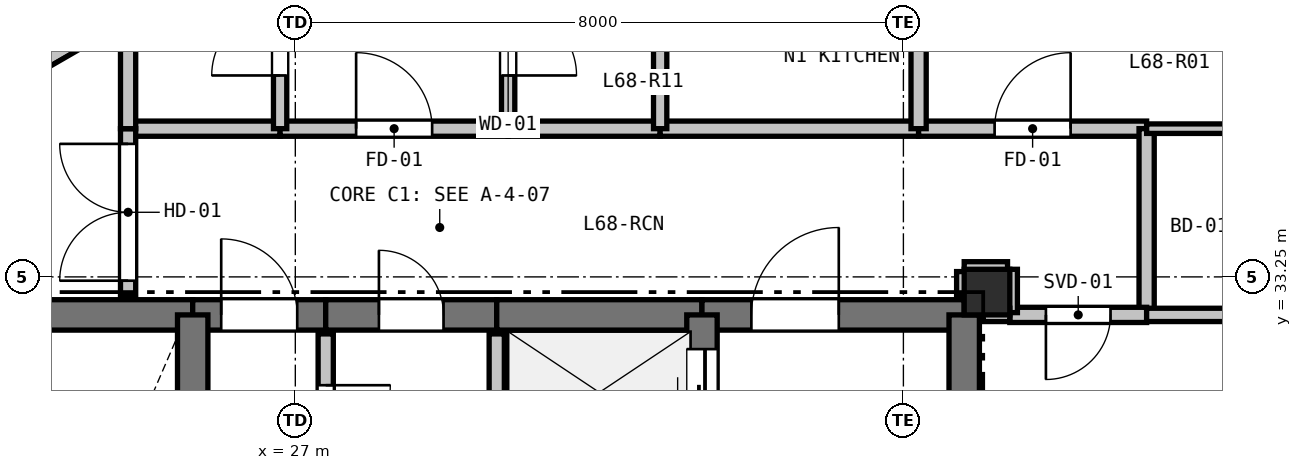
"""IFC4 building model, lengths in metres.
Left out: names, types, materials, properties, quantities, classifications, styles, units other than length and angle.
Written with IfcOpenShell. Run it as: python <this file> out.ifc"""

import sys

from ifc_helpers import new_model, si_unit, direction, frame, frame_2d, origin, origin_2d, place, context, subcontext, project, spatial, rectangle, extrude, element, fill, save


model = new_model("IFC4")
c1 = context("Model", 3, precision=1e-05, world=origin(), true_north=direction((0.0, 1.0)))
c2 = subcontext(c1, "Body", "Model", "MODEL_VIEW")
j1 = project(units=[si_unit("LENGTHUNIT", "METRE"), si_unit("PLANEANGLEUNIT", "RADIAN")], contexts=[c1])
p1 = place(None, origin())
s1 = spatial("IfcSite", under=j1, at=p1, CompositionType="ELEMENT")
p2 = place(p1, origin())
s2 = spatial("IfcBuilding", under=s1, at=p2, CompositionType="ELEMENT")
p3 = place(p2, frame((0.0, 0.0, 243.0)))
s3 = spatial("IfcBuildingStorey", under=s2, at=p3, CompositionType="ELEMENT", Elevation=243.0)
p4 = place(p3, frame((36.1, 33.05, 0.0), z_axis=(0.0, 0.0, 1.0), x_axis=(1.0, 0.0, 0.0)))
e1 = element("IfcColumn", 1, at=p4, inside=s3, PredefinedType="COLUMN", context=c2, shape_type="SweptSolid", body=[
    extrude(rectangle(XDim=0.6, YDim=0.6, at=origin_2d()), origin(), (0.0, 0.0, 1.0), 3.3),
])
p5 = place(p3, frame((20.066, 33.997, 0.0), z_axis=(0.0, 0.0, 1.0), x_axis=(0.866019557082, 0.500010126649, 0.0)))
e2 = element("IfcWall", 2, at=p5, inside=s3, PredefinedType="PARAPET", context=c2, shape_type="SweptSolid", body=[
    extrude(rectangle(XDim=8.228, YDim=0.2, at=frame_2d((4.114, 0.0))), origin(), (0.0, 0.0, 1.0), 0.2),
])
p6 = place(p3, frame((22.2, 32.75, 0.0), z_axis=(0.0, 0.0, 1.0), x_axis=(1.0, 0.0, 0.0)))
e3 = element("IfcWall", 3, at=p6, inside=s3, PredefinedType="SHEAR", context=c2, shape_type="SweptSolid", body=[
    extrude(rectangle(XDim=3.45, YDim=0.4, at=frame_2d((1.725, 0.0))), origin(), (0.0, 0.0, 1.0), 3.08),
])
p7 = place(p3, frame((25.65, 32.75, 0.0), z_axis=(0.0, 0.0, 1.0), x_axis=(1.0, 0.0, 0.0)))
e4 = element("IfcWall", 4, at=p7, inside=s3, PredefinedType="SHEAR", context=c2, shape_type="SweptSolid", body=[
    extrude(rectangle(XDim=1.75, YDim=0.4, at=frame_2d((0.875, 0.0))), origin(), (0.0, 0.0, 1.0), 3.08),
])
p8 = place(p7, frame((0.375, 0.0, 0.0)))
e5 = element("IfcOpeningElement", 5, at=p8, cuts=e4, PredefinedType="OPENING", context=c2, shape_type="SweptSolid", body=[
    extrude(rectangle(XDim=1.0, YDim=2.15, at=frame_2d((0.5, 1.075))), frame((0.0, 0.21, 0.0), z_axis=(0.0, -1.0, 0.0), x_axis=(1.0, 0.0, 0.0)), (0.0, 0.0, 1.0), 0.42),
])
p9 = place(p3, frame((27.4, 32.75, 0.0), z_axis=(0.0, 0.0, 1.0), x_axis=(1.0, 0.0, 0.0)))
e6 = element("IfcWall", 6, at=p9, inside=s3, PredefinedType="SHEAR", context=c2, shape_type="SweptSolid", body=[
    extrude(rectangle(XDim=2.25, YDim=0.4, at=frame_2d((1.125, 0.0))), origin(), (0.0, 0.0, 1.0), 3.08),
])
p10 = place(p9, frame((0.7, 0.0, 0.0)))
e7 = element("IfcOpeningElement", 7, at=p10, cuts=e6, PredefinedType="OPENING", context=c2, shape_type="SweptSolid", body=[
    extrude(rectangle(XDim=0.85, YDim=2.1, at=frame_2d((0.425, 1.05))), frame((0.0, 0.21, 0.0), z_axis=(0.0, -1.0, 0.0), x_axis=(1.0, 0.0, 0.0)), (0.0, 0.0, 1.0), 0.42),
])
p11 = place(p3, frame((29.65, 32.75, 0.0), z_axis=(0.0, 0.0, 1.0), x_axis=(1.0, 0.0, 0.0)))
e8 = element("IfcWall", 8, at=p11, inside=s3, PredefinedType="SHEAR", context=c2, shape_type="SweptSolid", body=[
    extrude(rectangle(XDim=2.7, YDim=0.4, at=frame_2d((1.35, 0.0))), origin(), (0.0, 0.0, 1.0), 3.08),
])
p12 = place(p3, frame((32.35, 32.75, 0.0), z_axis=(0.0, 0.0, 1.0), x_axis=(1.0, 0.0, 0.0)))
e9 = element("IfcWall", 9, at=p12, inside=s3, PredefinedType="SHEAR", context=c2, shape_type="SweptSolid", body=[
    extrude(rectangle(XDim=3.45, YDim=0.4, at=frame_2d((1.725, 0.0))), origin(), (0.0, 0.0, 1.0), 3.08),
])
p13 = place(p12, frame((0.65, 0.0, 0.0)))
e10 = element("IfcOpeningElement", 10, at=p13, cuts=e9, PredefinedType="OPENING", context=c2, shape_type="SweptSolid", body=[
    extrude(rectangle(XDim=1.15, YDim=2.15, at=frame_2d((0.575, 1.075))), frame((0.0, 0.21, 0.0), z_axis=(0.0, -1.0, 0.0), x_axis=(1.0, 0.0, 0.0)), (0.0, 0.0, 1.0), 0.42),
])
p14 = place(p3, frame((35.8, 32.75, 0.0), z_axis=(0.0, 0.0, 1.0), x_axis=(0.0, -1.0, 0.0)))
e11 = element("IfcWall", 11, at=p14, inside=s3, PredefinedType="SHEAR", context=c2, shape_type="SweptSolid", body=[
    extrude(rectangle(XDim=4.65, YDim=0.4, at=frame_2d((2.325, 0.0))), origin(), (0.0, 0.0, 1.0), 3.08),
])
p15 = place(p3, frame((25.65, 27.95, 0.0), z_axis=(0.0, 0.0, 1.0), x_axis=(0.0, 1.0, 0.0)))
e12 = element("IfcWall", 12, at=p15, inside=s3, PredefinedType="SHEAR", context=c2, shape_type="SweptSolid", body=[
    extrude(rectangle(XDim=4.8, YDim=0.4, at=frame_2d((2.4, 0.0))), origin(), (0.0, 0.0, 1.0), 3.08),
])
p16 = place(p3, frame((32.35, 30.75, 0.0), z_axis=(0.0, 0.0, 1.0), x_axis=(0.0, 1.0, 0.0)))
e13 = element("IfcWall", 13, at=p16, inside=s3, PredefinedType="SHEAR", context=c2, shape_type="SweptSolid", body=[
    extrude(rectangle(XDim=2.0, YDim=0.4, at=frame_2d((1.0, 0.0))), origin(), (0.0, 0.0, 1.0), 3.08),
])
p17 = place(p16, frame((0.45, 0.0, 0.0)))
e14 = element("IfcOpeningElement", 14, at=p17, cuts=e13, PredefinedType="OPENING", context=c2, shape_type="SweptSolid", body=[
    extrude(rectangle(XDim=1.1, YDim=2.15, at=frame_2d((0.55, 1.075))), frame((0.0, 0.21, 0.0), z_axis=(0.0, -1.0, 0.0), x_axis=(1.0, 0.0, 0.0)), (0.0, 0.0, 1.0), 0.42),
])
p18 = place(p3, frame((29.65, 30.3, 0.0), z_axis=(0.0, 0.0, 1.0), x_axis=(0.0, 1.0, 0.0)))
e15 = element("IfcWall", 15, at=p18, inside=s3, PredefinedType="PARTITIONING", context=c2, shape_type="SweptSolid", body=[
    extrude(rectangle(XDim=2.2, YDim=0.2, at=frame_2d((1.1, 0.0))), origin(), (0.0, 0.0, 1.0), 3.08),
])
p19 = place(p3, frame((27.4, 32.5, 0.0), z_axis=(0.0, 0.0, 1.0), x_axis=(0.0, -1.0, 0.0)))
e16 = element("IfcWall", 16, at=p19, inside=s3, PredefinedType="PARTITIONING", context=c2, shape_type="SweptSolid", body=[
    extrude(rectangle(XDim=2.2, YDim=0.2, at=frame_2d((1.1, 0.0))), origin(), (0.0, 0.0, 1.0), 3.08),
])
p20 = place(p19, frame((0.675, 0.0, 0.0)))
e17 = element("IfcOpeningElement", 17, at=p20, cuts=e16, PredefinedType="OPENING", context=c2, shape_type="SweptSolid", body=[
    extrude(rectangle(XDim=0.85, YDim=2.1, at=frame_2d((0.425, 1.05))), frame((0.0, 0.11, 0.0), z_axis=(0.0, -1.0, 0.0), x_axis=(1.0, 0.0, 0.0)), (0.0, 0.0, 1.0), 0.22),
])
p21 = place(p3, frame((24.8, 35.2, 0.0), z_axis=(0.0, 0.0, 1.0), x_axis=(1.0, 0.0, 0.0)))
e18 = element("IfcWall", 18, at=p21, inside=s3, PredefinedType="PARTITIONING", context=c2, shape_type="SweptSolid", body=[
    extrude(rectangle(XDim=2.0, YDim=0.2, at=frame_2d((1.0, 0.0))), origin(), (0.0, 0.0, 1.0), 3.08),
])
p22 = place(p3, frame((26.8, 35.2, 0.0), z_axis=(0.0, 0.0, 1.0), x_axis=(1.0, 0.0, 0.0)))
e19 = element("IfcWall", 19, at=p22, inside=s3, PredefinedType="PARTITIONING", context=c2, shape_type="SweptSolid", body=[
    extrude(rectangle(XDim=3.0, YDim=0.2, at=frame_2d((1.5, 0.0))), origin(), (0.0, 0.0, 1.0), 3.08),
])
p23 = place(p22, frame((1.0, 0.0, 0.0)))
e20 = element("IfcOpeningElement", 20, at=p23, cuts=e19, PredefinedType="OPENING", context=c2, shape_type="SweptSolid", body=[
    extrude(rectangle(XDim=1.0, YDim=2.15, at=frame_2d((0.5, 1.075))), frame((0.0, 0.11, 0.0), z_axis=(0.0, -1.0, 0.0), x_axis=(1.0, 0.0, 0.0)), (0.0, 0.0, 1.0), 0.22),
])
p24 = place(p3, frame((29.8, 35.2, 0.0), z_axis=(0.0, 0.0, 1.0), x_axis=(1.0, 0.0, 0.0)))
e21 = element("IfcWall", 21, at=p24, inside=s3, PredefinedType="PARTITIONING", context=c2, shape_type="SweptSolid", body=[
    extrude(rectangle(XDim=2.0, YDim=0.2, at=frame_2d((1.0, 0.0))), origin(), (0.0, 0.0, 1.0), 3.08),
])
p25 = place(p3, frame((31.8, 35.2, 0.0), z_axis=(0.0, 0.0, 1.0), x_axis=(1.0, 0.0, 0.0)))
e22 = element("IfcWall", 22, at=p25, inside=s3, PredefinedType="PARTITIONING", context=c2, shape_type="SweptSolid", body=[
    extrude(rectangle(XDim=3.4, YDim=0.2, at=frame_2d((1.7, 0.0))), origin(), (0.0, 0.0, 1.0), 3.08),
])
p26 = place(p3, frame((35.2, 35.2, 0.0), z_axis=(0.0, 0.0, 1.0), x_axis=(1.0, 0.0, 0.0)))
e23 = element("IfcWall", 23, at=p26, inside=s3, PredefinedType="PARTITIONING", context=c2, shape_type="SweptSolid", body=[
    extrude(rectangle(XDim=3.0, YDim=0.2, at=frame_2d((1.5, 0.0))), origin(), (0.0, 0.0, 1.0), 2.528),
])
p27 = place(p26, frame((1.0, 0.0, 0.0)))
e24 = element("IfcOpeningElement", 24, at=p27, cuts=e23, PredefinedType="OPENING", context=c2, shape_type="SweptSolid", body=[
    extrude(rectangle(XDim=1.0, YDim=2.15, at=frame_2d((0.5, 1.075))), frame((0.0, 0.11, 0.0), z_axis=(0.0, -1.0, 0.0), x_axis=(1.0, 0.0, 0.0)), (0.0, 0.0, 1.0), 0.22),
])
p28 = place(p3, frame((38.2, 35.2, 0.0), z_axis=(0.0, 0.0, 1.0), x_axis=(0.0, -1.0, 0.0)))
e25 = element("IfcWall", 25, at=p28, inside=s3, PredefinedType="PARTITIONING", context=c2, shape_type="SweptSolid", body=[
    extrude(rectangle(XDim=2.45, YDim=0.2, at=frame_2d((1.225, 0.0))), origin(), (0.0, 0.0, 1.0), 3.08),
])
p29 = place(p3, frame((38.2, 32.75, 0.0), z_axis=(0.0, 0.0, 1.0), x_axis=(-1.0, 0.0, 0.0)))
e26 = element("IfcWall", 26, at=p29, inside=s3, PredefinedType="PARTITIONING", context=c2, shape_type="SweptSolid", body=[
    extrude(rectangle(XDim=1.8, YDim=0.2, at=frame_2d((0.9, 0.0))), origin(), (0.0, 0.0, 1.0), 3.08),
])
p30 = place(p29, frame((0.475, 0.0, 0.0)))
e27 = element("IfcOpeningElement", 27, at=p30, cuts=e26, PredefinedType="OPENING", context=c2, shape_type="SweptSolid", body=[
    extrude(rectangle(XDim=0.85, YDim=2.1, at=frame_2d((0.425, 1.05))), frame((0.0, 0.11, 0.0), z_axis=(0.0, -1.0, 0.0), x_axis=(1.0, 0.0, 0.0)), (0.0, 0.0, 1.0), 0.22),
])
for number, where, z_axis, x_axis in (
    (28, (36.4, 32.78, 0.0), (0.0, 0.0, 1.0), (0.0, 1.0, 0.0)),
    (29, (36.37, 33.35, 0.0), (0.0, 0.0, 1.0), (-1.0, 0.0, 0.0)),
):
    element("IfcWall", number, at=place(p3, frame(where, z_axis=z_axis, x_axis=x_axis)), inside=s3, PredefinedType="PARTITIONING", context=c2, shape_type="SweptSolid", body=[
        extrude(rectangle(XDim=0.57, YDim=0.2, at=frame_2d((0.285, 0.0))), origin(), (0.0, 0.0, 1.0), 2.528),
    ])
p31 = place(p3, frame((35.8, 33.32, 0.0), z_axis=(0.0, 0.0, 1.0), x_axis=(0.0, -1.0, 0.0)))
e30 = element("IfcWall", 30, at=p31, inside=s3, PredefinedType="PARTITIONING", context=c2, shape_type="SweptSolid", body=[
    extrude(rectangle(XDim=0.32, YDim=0.2, at=frame_2d((0.16, 0.0))), origin(), (0.0, 0.0, 1.0), 2.605),
])
p32 = place(p3, frame((24.8, 33.0, 0.0), z_axis=(0.0, 0.0, 1.0), x_axis=(0.0, 1.0, 0.0)))
e31 = element("IfcWall", 31, at=p32, inside=s3, PredefinedType="PARTITIONING", context=c2, shape_type="SweptSolid", body=[
    extrude(rectangle(XDim=2.2, YDim=0.2, at=frame_2d((1.1, 0.0))), origin(), (0.0, 0.0, 1.0), 2.605),
])
p33 = place(p32, frame((0.2, 0.0, 0.0)))
e32 = element("IfcOpeningElement", 32, at=p33, cuts=e31, PredefinedType="OPENING", context=c2, shape_type="SweptSolid", body=[
    extrude(rectangle(XDim=1.8, YDim=2.2, at=frame_2d((0.9, 1.1))), frame((0.0, 0.11, 0.0), z_axis=(0.0, -1.0, 0.0), x_axis=(1.0, 0.0, 0.0)), (0.0, 0.0, 1.0), 0.22),
])
p34 = place(p3, frame((29.8, 37.5, 0.0), z_axis=(0.0, 0.0, 1.0), x_axis=(0.0, -1.0, 0.0)))
e33 = element("IfcWall", 33, at=p34, inside=s3, PredefinedType="PLUMBINGWALL", context=c2, shape_type="SweptSolid", body=[
    extrude(rectangle(XDim=2.3, YDim=0.175, at=frame_2d((1.15, 0.0))), origin(), (0.0, 0.0, 1.0), 3.08),
])
p35 = place(p34, frame((0.7, 0.0, 0.0)))
e34 = element("IfcOpeningElement", 34, at=p35, cuts=e33, PredefinedType="OPENING", context=c2, shape_type="SweptSolid", body=[
    extrude(rectangle(XDim=0.9, YDim=2.1, at=frame_2d((0.45, 1.05))), frame((0.0, 0.097, 0.0), z_axis=(0.0, -1.0, 0.0), x_axis=(1.0, 0.0, 0.0)), (0.0, 0.0, 1.0), 0.195),
])
p36 = place(p3, frame((26.8, 35.2, 0.0), z_axis=(0.0, 0.0, 1.0), x_axis=(0.0, 1.0, 0.0)))
e35 = element("IfcWall", 35, at=p36, inside=s3, PredefinedType="PLUMBINGWALL", context=c2, shape_type="SweptSolid", body=[
    extrude(rectangle(XDim=2.3, YDim=0.175, at=frame_2d((1.15, 0.0))), origin(), (0.0, 0.0, 1.0), 2.365),
])
p37 = place(p36, frame((0.7, 0.0, 0.0)))
e36 = element("IfcOpeningElement", 36, at=p37, cuts=e35, PredefinedType="OPENING", context=c2, shape_type="SweptSolid", body=[
    extrude(rectangle(XDim=0.9, YDim=2.1, at=frame_2d((0.45, 1.05))), frame((0.0, 0.097, 0.0), z_axis=(0.0, -1.0, 0.0), x_axis=(1.0, 0.0, 0.0)), (0.0, 0.0, 1.0), 0.195),
])
p38 = place(p3, frame((36.05, 32.75, 0.0), z_axis=(0.0, 0.0, 1.0), x_axis=(1.0, 0.0, 0.0)))
e37 = element("IfcWall", 37, at=p38, inside=s3, PredefinedType="PLUMBINGWALL", context=c2, shape_type="SweptSolid", body=[
    extrude(rectangle(XDim=0.35, YDim=0.175, at=frame_2d((0.175, 0.0))), origin(), (0.0, 0.0, 1.0), 2.605),
])
p39 = place(p3, frame((38.2, 32.75, 0.0), z_axis=(0.0, 0.0, 1.0), x_axis=(1.0, 0.0, 0.0)))
e38 = element("IfcWall", 38, at=p39, inside=s3, PredefinedType="PLUMBINGWALL", context=c2, shape_type="SweptSolid", body=[
    extrude(rectangle(XDim=1.406, YDim=0.175, at=frame_2d((0.703, 0.0))), origin(), (0.0, 0.0, 1.0), 2.365),
])
p40 = place(p3, frame((24.8, 35.2, 0.0), z_axis=(0.0, 0.0, 1.0), x_axis=(0.0, 1.0, 0.0)))
e39 = element("IfcWall", 39, at=p40, inside=s3, PredefinedType="PARTITIONING", context=c2, shape_type="SweptSolid", body=[
    extrude(rectangle(XDim=1.484, YDim=0.2, at=frame_2d((0.742, 0.0))), origin(), (0.0, 0.0, 1.0), 2.365),
])
p41 = place(p3, frame((31.8, 37.5, 0.0), z_axis=(0.0, 0.0, 1.0), x_axis=(0.0, -1.0, 0.0)))
e40 = element("IfcWall", 40, at=p41, inside=s3, PredefinedType="PLUMBINGWALL", context=c2, shape_type="SweptSolid", body=[
    extrude(rectangle(XDim=2.3, YDim=0.175, at=frame_2d((1.15, 0.0))), origin(), (0.0, 0.0, 1.0), 3.08),
])
p42 = place(p3, frame((35.2, 37.5, 0.0), z_axis=(0.0, 0.0, 1.0), x_axis=(0.0, -1.0, 0.0)))
e41 = element("IfcWall", 41, at=p42, inside=s3, PredefinedType="PARTITIONING", context=c2, shape_type="SweptSolid", body=[
    extrude(rectangle(XDim=2.3, YDim=0.2, at=frame_2d((1.15, 0.0))), origin(), (0.0, 0.0, 1.0), 3.08),
])
p43 = place(p3, frame((39.606, 35.2, 0.0), z_axis=(0.0, 0.0, 1.0), x_axis=(-1.0, 0.0, 0.0)))
e42 = element("IfcWall", 42, at=p43, inside=s3, PredefinedType="PARTITIONING", context=c2, shape_type="SweptSolid", body=[
    extrude(rectangle(XDim=1.406, YDim=0.125, at=frame_2d((0.703, 0.0))), origin(), (0.0, 0.0, 1.0), 2.365),
])
p44 = place(p8, origin())
e43 = element("IfcDoor", 43, at=p44, inside=s3, OperationType="SINGLE_SWING_LEFT", PredefinedType="DOOR", context=c2, shape_type="SweptSolid", body=[
    extrude(rectangle(XDim=1.0, YDim=2.15, at=frame_2d((0.5, 1.075))), frame((0.0, 0.025, 0.0), z_axis=(0.0, -1.0, 0.0), x_axis=(1.0, 0.0, 0.0)), (0.0, 0.0, 1.0), 0.05),
])
fill(e5, e43)
p45 = place(p17, origin())
e44 = element("IfcDoor", 44, at=p45, inside=s3, OperationType="SLIDING_TO_LEFT", PredefinedType="DOOR", context=c2, shape_type="SweptSolid", body=[
    extrude(rectangle(XDim=1.1, YDim=2.15, at=frame_2d((0.55, 1.075))), frame((0.0, 0.025, 0.0), z_axis=(0.0, -1.0, 0.0), x_axis=(1.0, 0.0, 0.0)), (0.0, 0.0, 1.0), 0.05),
])
fill(e14, e44)
p46 = place(p13, origin())
e45 = element("IfcDoor", 45, at=p46, inside=s3, OperationType="SINGLE_SWING_RIGHT", PredefinedType="DOOR", context=c2, shape_type="SweptSolid", body=[
    extrude(rectangle(XDim=1.15, YDim=2.15, at=frame_2d((0.575, 1.075))), frame((0.0, 0.025, 0.0), z_axis=(0.0, -1.0, 0.0), x_axis=(1.0, 0.0, 0.0)), (0.0, 0.0, 1.0), 0.05),
])
fill(e10, e45)
p47 = place(p20, origin())
e46 = element("IfcDoor", 46, at=p47, inside=s3, OperationType="SINGLE_SWING_LEFT", PredefinedType="DOOR", context=c2, shape_type="SweptSolid", body=[
    extrude(rectangle(XDim=0.85, YDim=2.1, at=frame_2d((0.425, 1.05))), frame((0.0, 0.025, 0.0), z_axis=(0.0, -1.0, 0.0), x_axis=(1.0, 0.0, 0.0)), (0.0, 0.0, 1.0), 0.05),
])
fill(e17, e46)
p48 = place(p23, origin())
e47 = element("IfcDoor", 47, at=p48, inside=s3, OperationType="SINGLE_SWING_LEFT", PredefinedType="DOOR", context=c2, shape_type="SweptSolid", body=[
    extrude(rectangle(XDim=1.0, YDim=2.15, at=frame_2d((0.5, 1.075))), frame((0.0, 0.025, 0.0), z_axis=(0.0, -1.0, 0.0), x_axis=(1.0, 0.0, 0.0)), (0.0, 0.0, 1.0), 0.05),
])
fill(e20, e47)
p49 = place(p30, origin())
e48 = element("IfcDoor", 48, at=p49, inside=s3, OperationType="SINGLE_SWING_RIGHT", PredefinedType="DOOR", context=c2, shape_type="SweptSolid", body=[
    extrude(rectangle(XDim=0.85, YDim=2.1, at=frame_2d((0.425, 1.05))), frame((0.0, 0.025, 0.0), z_axis=(0.0, -1.0, 0.0), x_axis=(1.0, 0.0, 0.0)), (0.0, 0.0, 1.0), 0.05),
])
fill(e27, e48)
p50 = place(p10, origin())
e49 = element("IfcDoor", 49, at=p50, inside=s3, OperationType="SINGLE_SWING_LEFT", PredefinedType="DOOR", context=c2, shape_type="SweptSolid", body=[
    extrude(rectangle(XDim=0.85, YDim=2.1, at=frame_2d((0.425, 1.05))), frame((0.0, 0.025, 0.0), z_axis=(0.0, -1.0, 0.0), x_axis=(1.0, 0.0, 0.0)), (0.0, 0.0, 1.0), 0.05),
])
fill(e7, e49)
p51 = place(p27, origin())
e50 = element("IfcDoor", 50, at=p51, inside=s3, OperationType="SINGLE_SWING_RIGHT", PredefinedType="DOOR", context=c2, shape_type="SweptSolid", body=[
    extrude(rectangle(XDim=1.0, YDim=2.15, at=frame_2d((0.5, 1.075))), frame((0.0, 0.025, 0.0), z_axis=(0.0, -1.0, 0.0), x_axis=(1.0, 0.0, 0.0)), (0.0, 0.0, 1.0), 0.05),
])
fill(e24, e50)
p52 = place(p33, origin())
e51 = element("IfcDoor", 51, at=p52, inside=s3, OperationType="DOUBLE_DOOR_SINGLE_SWING", PredefinedType="DOOR", context=c2, shape_type="SweptSolid", body=[
    extrude(rectangle(XDim=1.8, YDim=2.2, at=frame_2d((0.9, 1.1))), frame((0.0, 0.025, 0.0), z_axis=(0.0, -1.0, 0.0), x_axis=(1.0, 0.0, 0.0)), (0.0, 0.0, 1.0), 0.05),
])
fill(e32, e51)
p53 = place(p37, origin())
e52 = element("IfcDoor", 52, at=p53, inside=s3, OperationType="SINGLE_SWING_LEFT", PredefinedType="DOOR", context=c2, shape_type="SweptSolid", body=[
    extrude(rectangle(XDim=0.9, YDim=2.1, at=frame_2d((0.45, 1.05))), frame((0.0, 0.025, 0.0), z_axis=(0.0, -1.0, 0.0), x_axis=(1.0, 0.0, 0.0)), (0.0, 0.0, 1.0), 0.05),
])
fill(e36, e52)
p54 = place(p35, origin())
e53 = element("IfcDoor", 53, at=p54, inside=s3, OperationType="SINGLE_SWING_RIGHT", PredefinedType="DOOR", context=c2, shape_type="SweptSolid", body=[
    extrude(rectangle(XDim=0.9, YDim=2.1, at=frame_2d((0.45, 1.05))), frame((0.0, 0.025, 0.0), z_axis=(0.0, -1.0, 0.0), x_axis=(1.0, 0.0, 0.0)), (0.0, 0.0, 1.0), 0.05),
])
fill(e34, e53)
save(model, sys.argv[1])
